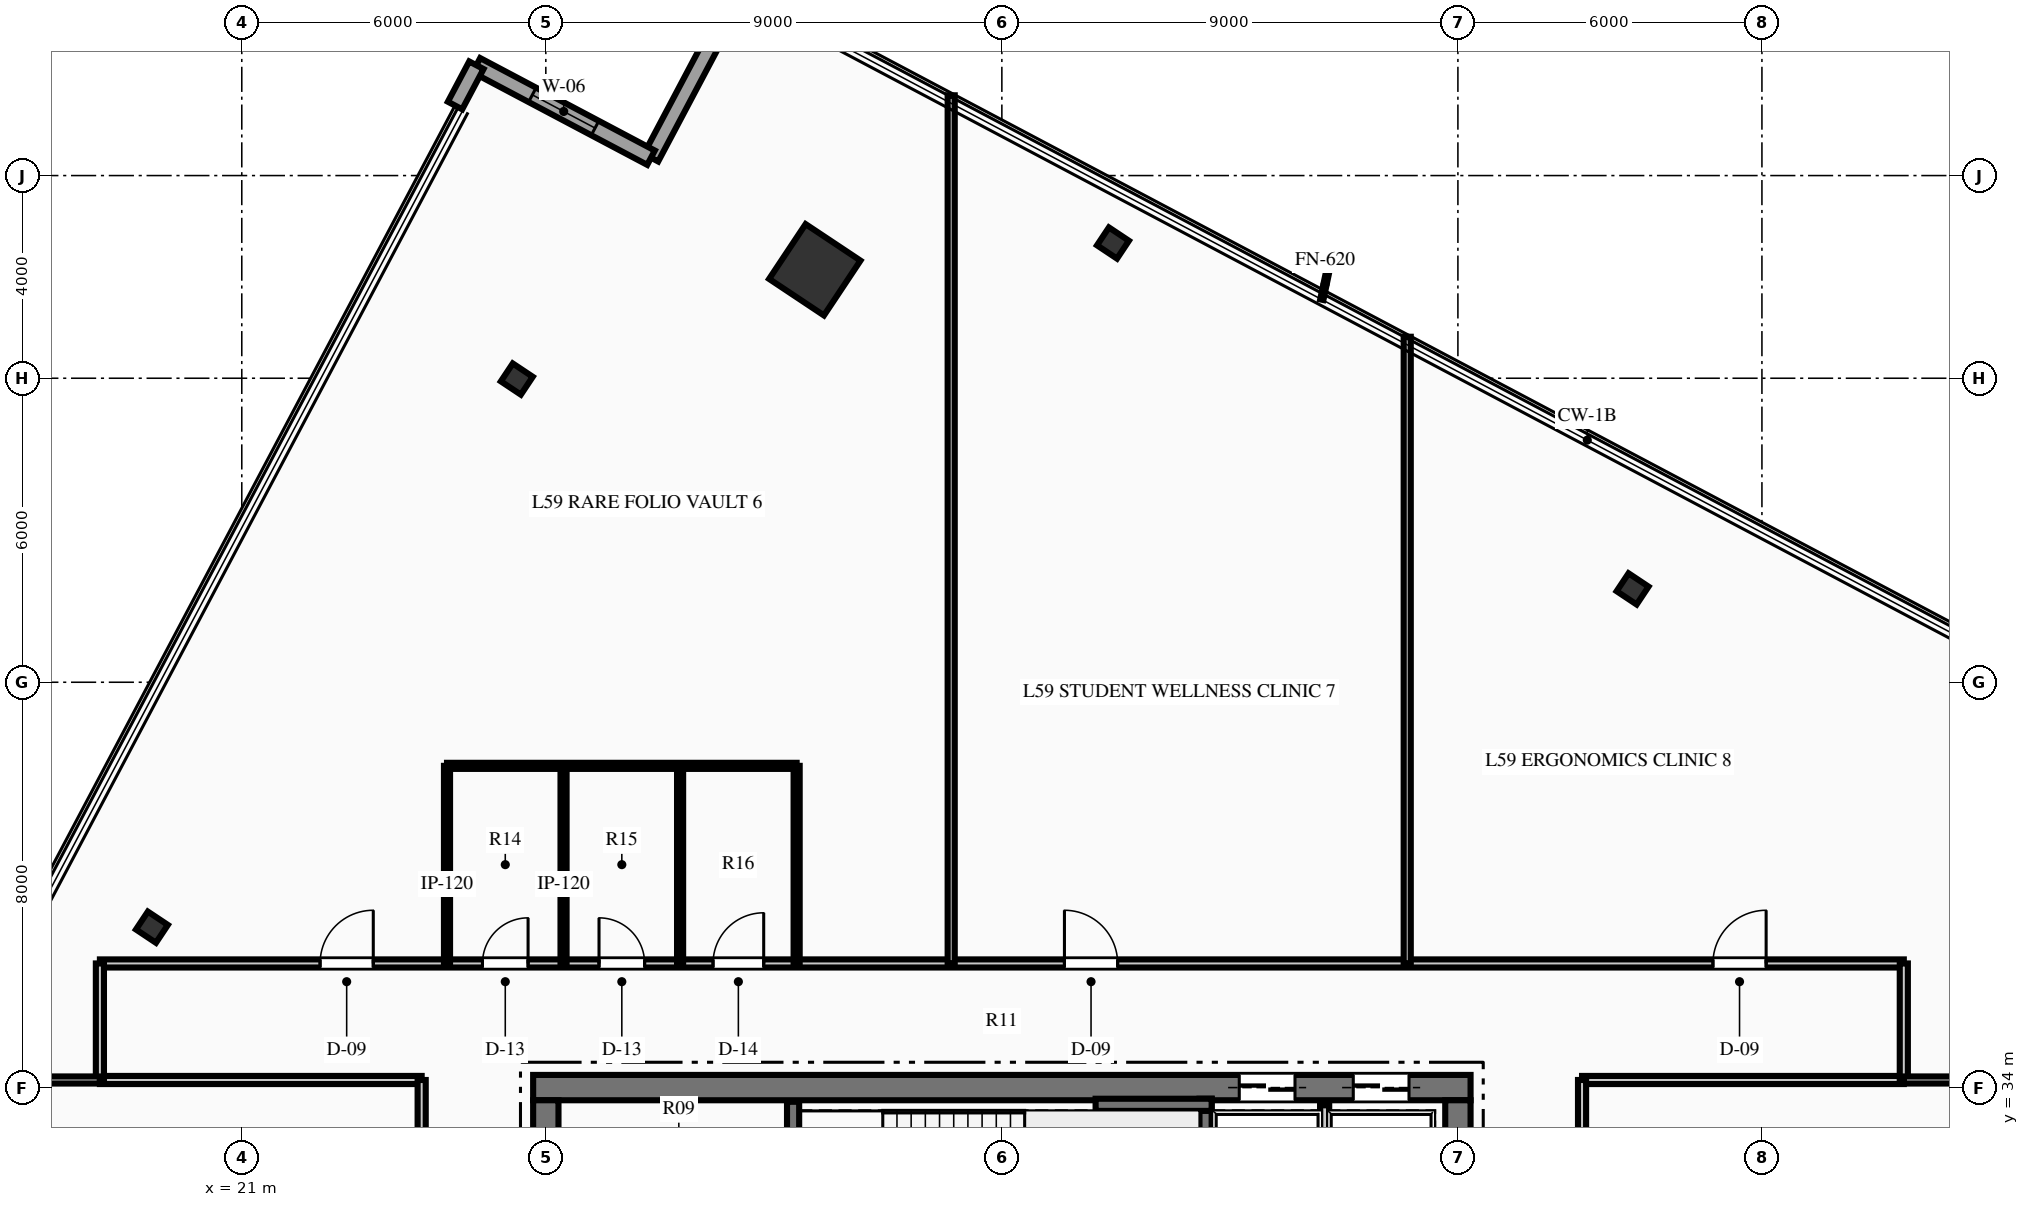
"""IFC4 building model, lengths in metres.
Left out: names, types, materials, properties, quantities, classifications, styles, units other than length and angle.
Written with IfcOpenShell. Run it as: python <this file> out.ifc"""

import sys

from ifc_helpers import new_model, si_unit, direction, frame, frame_2d, origin, origin_2d, place, context, subcontext, project, spatial, rectangle, hollow_rectangle, i_section, extrude, element, fill, save


model = new_model("IFC4")
c1 = context("Model", 3, precision=1e-05, world=origin(), true_north=direction((0.0, 1.0)))
c2 = subcontext(c1, "Body", "Model", "MODEL_VIEW")
j1 = project(units=[si_unit("LENGTHUNIT", "METRE"), si_unit("PLANEANGLEUNIT", "RADIAN")], contexts=[c1])
p1 = place(None, origin())
s1 = spatial("IfcSite", under=j1, at=p1, CompositionType="ELEMENT")
p2 = place(p1, origin())
s2 = spatial("IfcBuilding", under=s1, at=p2, CompositionType="ELEMENT")
p3 = place(p2, frame((0.0, 0.0, 235.95)))
s3 = spatial("IfcBuildingStorey", under=s2, at=p3, CompositionType="ELEMENT", Elevation=235.95)
p4 = place(p3, frame((26.75, 34.0, 0.0), z_axis=(0.0, 0.0, 1.0), x_axis=(1.0, 0.0, 0.0)))
e1 = element("IfcWall", 1, at=p4, inside=s3, PredefinedType="SHEAR", context=c2, shape_type="SweptSolid", body=[
    extrude(rectangle(XDim=18.5, YDim=0.5, at=frame_2d((9.25, 0.0))), origin(), (0.0, 0.0, 1.0), 3.75),
])
p5 = place(p4, frame((13.935, 0.0, 0.0)))
e2 = element("IfcOpeningElement", 2, at=p5, cuts=e1, PredefinedType="OPENING", context=c2, shape_type="SweptSolid", body=[
    extrude(rectangle(XDim=1.1, YDim=2.15, at=frame_2d((0.55, 1.075))), frame((0.0, 0.26, 0.0), z_axis=(0.0, -1.0, 0.0), x_axis=(1.0, 0.0, 0.0)), (0.0, 0.0, 1.0), 0.52),
])
p6 = place(p4, frame((16.185, 0.0, 0.0)))
e3 = element("IfcOpeningElement", 3, at=p6, cuts=e1, PredefinedType="OPENING", context=c2, shape_type="SweptSolid", body=[
    extrude(rectangle(XDim=1.1, YDim=2.15, at=frame_2d((0.55, 1.075))), frame((0.0, 0.26, 0.0), z_axis=(0.0, -1.0, 0.0), x_axis=(1.0, 0.0, 0.0)), (0.0, 0.0, 1.0), 0.52),
])
p7 = place(p3, frame((27.0, 18.25, 0.0), z_axis=(0.0, 0.0, 1.0), x_axis=(0.0, 1.0, 0.0)))
e4 = element("IfcWall", 4, at=p7, inside=s3, PredefinedType="SHEAR", context=c2, shape_type="SweptSolid", body=[
    extrude(rectangle(XDim=15.5, YDim=0.5, at=frame_2d((7.75, 0.0))), origin(), (0.0, 0.0, 1.0), 3.75),
])
p8 = place(p7, frame((9.99, 0.0, 0.0)))
e5 = element("IfcOpeningElement", 5, at=p8, cuts=e4, PredefinedType="OPENING", context=c2, shape_type="SweptSolid", body=[
    extrude(rectangle(XDim=1.4, YDim=2.2, at=frame_2d((0.7, 1.1))), frame((0.0, 0.26, 0.0), z_axis=(0.0, -1.0, 0.0), x_axis=(1.0, 0.0, 0.0)), (0.0, 0.0, 1.0), 0.52),
])
p9 = place(p3, frame((45.0, 18.25, 0.0), z_axis=(0.0, 0.0, 1.0), x_axis=(0.0, 1.0, 0.0)))
e6 = element("IfcWall", 6, at=p9, inside=s3, PredefinedType="SHEAR", context=c2, shape_type="SweptSolid", body=[
    extrude(rectangle(XDim=15.5, YDim=0.5, at=frame_2d((7.75, 0.0))), origin(), (0.0, 0.0, 1.0), 3.75),
])
p10 = place(p9, frame((9.99, 0.0, 0.0)))
e7 = element("IfcOpeningElement", 7, at=p10, cuts=e6, PredefinedType="OPENING", context=c2, shape_type="SweptSolid", body=[
    extrude(rectangle(XDim=1.4, YDim=2.2, at=frame_2d((0.7, 1.1))), frame((0.0, 0.26, 0.0), z_axis=(0.0, -1.0, 0.0), x_axis=(1.0, 0.0, 0.0)), (0.0, 0.0, 1.0), 0.52),
])
p11 = place(p3, frame((31.88, 29.93, 0.0), z_axis=(0.0, 0.0, 1.0), x_axis=(0.0, 1.0, 0.0)))
e8 = element("IfcWall", 8, at=p11, inside=s3, PredefinedType="SHEAR", context=c2, shape_type="SweptSolid", body=[
    extrude(rectangle(XDim=3.79, YDim=0.24, at=frame_2d((1.895, 0.0))), origin(), (0.0, 0.0, 1.0), 3.75),
])
p12 = place(p3, frame((40.02, 29.93, 0.0), z_axis=(0.0, 0.0, 1.0), x_axis=(0.0, 1.0, 0.0)))
e9 = element("IfcWall", 9, at=p12, inside=s3, PredefinedType="SHEAR", context=c2, shape_type="SweptSolid", body=[
    extrude(rectangle(XDim=3.85, YDim=0.24, at=frame_2d((1.925, 0.0))), origin(), (0.0, 0.0, 1.0), 3.75),
])
p13 = place(p3, frame((37.85, 33.66, 0.0), z_axis=(0.0, 0.0, 1.0), x_axis=(1.0, 0.0, 0.0)))
e10 = element("IfcWall", 10, at=p13, inside=s3, PredefinedType="SHEAR", context=c2, shape_type="SweptSolid", body=[
    extrude(rectangle(XDim=2.29, YDim=0.24, at=frame_2d((1.145, 0.0))), origin(), (0.0, 0.0, 1.0), 3.75),
])
p14 = place(p3, frame((32.308, 50.141, 0.0), z_axis=(0.0, 0.0, 1.0), x_axis=(0.554118199338, 0.832437998389, 0.0)))
e11 = element("IfcColumn", 11, at=p14, inside=s3, PredefinedType="COLUMN", context=c2, shape_type="SweptSolid", body=[
    extrude(hollow_rectangle(XDim=1.3, YDim=1.3, WallThickness=0.06, at=origin_2d()), origin(), (0.0, 0.0, 1.0), 3.75),
])
for number, where, z_axis, x_axis in (
    (12, (48.448, 43.842, 0.0), (0.0, 0.0, 1.0), (0.554, 0.832, 0.0)),
    (13, (38.193, 50.668, 0.0), (0.0, 0.0, 1.0), (0.554, 0.832, 0.0)),
    (14, (26.428, 47.984, 0.0), (0.0, 0.0, 1.0), (0.554, 0.832, 0.0)),
    (15, (19.226, 37.166, 0.0), (0.0, 0.0, 1.0), (0.554, 0.832, 0.0)),
):
    element("IfcColumn", number, at=place(p3, frame(where, z_axis=z_axis, x_axis=x_axis)), inside=s3, PredefinedType="COLUMN", context=c2, shape_type="SweptSolid", body=[
        extrude(i_section(OverallWidth=0.424, OverallDepth=0.474, WebThickness=0.048, FlangeThickness=0.077, at=origin_2d()), origin(), (0.0, 0.0, 1.0), 3.75),
    ])
p15 = place(p3, frame((29.076, 52.353, 0.0), z_axis=(0.0, 0.0, 1.0), x_axis=(0.467925110021, 0.883768120839, 0.0)))
e16 = element("IfcWall", 16, at=p15, inside=s3, PredefinedType="STANDARD", context=c2, shape_type="SweptSolid", body=[
    extrude(rectangle(XDim=3.9, YDim=0.32, at=frame_2d((1.95, 0.0))), origin(), (0.0, 0.0, 1.0), 3.4),
])
p16 = place(p3, frame((25.63, 54.178, 0.0), z_axis=(0.0, 0.0, 1.0), x_axis=(0.883754413477, -0.46795099814, 0.0)))
e17 = element("IfcWall", 17, at=p16, inside=s3, PredefinedType="STANDARD", context=c2, shape_type="SweptSolid", body=[
    extrude(rectangle(XDim=3.9, YDim=0.32, at=frame_2d((1.95, 0.0))), origin(), (0.0, 0.0, 1.0), 3.4),
])
p17 = place(p16, frame((1.25, 0.0, 0.85)))
e18 = element("IfcOpeningElement", 18, at=p17, cuts=e17, PredefinedType="OPENING", context=c2, shape_type="SweptSolid", body=[
    extrude(rectangle(XDim=1.4, YDim=2.0, at=frame_2d((0.7, 1.0))), frame((0.0, 0.17, 0.0), z_axis=(0.0, -1.0, 0.0), x_axis=(1.0, 0.0, 0.0)), (0.0, 0.0, 1.0), 0.34),
])
p18 = place(p3, frame((25.209, 53.382, 0.0), z_axis=(0.0, 0.0, 1.0), x_axis=(0.467925110021, 0.883768120839, 0.0)))
e19 = element("IfcWall", 19, at=p18, inside=s3, PredefinedType="STANDARD", context=c2, shape_type="SweptSolid", body=[
    extrude(rectangle(XDim=0.9, YDim=0.32, at=frame_2d((0.45, 0.0))), origin(), (0.0, 0.0, 1.0), 3.4),
])
p19 = place(p3, frame((42.37, 29.9, 0.0), z_axis=(0.0, 0.0, 1.0), x_axis=(0.0, 1.0, 0.0)))
e20 = element("IfcWall", 20, at=p19, inside=s3, PredefinedType="PARTITIONING", context=c2, shape_type="SweptSolid", body=[
    extrude(rectangle(XDim=3.75, YDim=0.18, at=frame_2d((1.875, 0.0))), origin(), (0.0, 0.0, 1.0), 3.4),
])
p20 = place(p3, frame((18.2, 36.45, 0.0), z_axis=(0.0, 0.0, 1.0), x_axis=(1.0, 0.0, 0.0)))
e21 = element("IfcWall", 21, at=p20, inside=s3, PredefinedType="PARTITIONING", context=c2, shape_type="SweptSolid", body=[
    extrude(rectangle(XDim=35.6, YDim=0.16, at=frame_2d((17.8, 0.0))), origin(), (0.0, 0.0, 1.0), 2.779),
])
p21 = place(p20, frame((7.55, 0.0, 0.0)))
e22 = element("IfcOpeningElement", 22, at=p21, cuts=e21, PredefinedType="OPENING", context=c2, shape_type="SweptSolid", body=[
    extrude(rectangle(XDim=0.9, YDim=2.15, at=frame_2d((0.45, 1.075))), frame((0.0, 0.09, 0.0), z_axis=(0.0, -1.0, 0.0), x_axis=(1.0, 0.0, 0.0)), (0.0, 0.0, 1.0), 0.18),
])
p22 = place(p20, frame((9.85, 0.0, 0.0)))
e23 = element("IfcOpeningElement", 23, at=p22, cuts=e21, PredefinedType="OPENING", context=c2, shape_type="SweptSolid", body=[
    extrude(rectangle(XDim=0.9, YDim=2.15, at=frame_2d((0.45, 1.075))), frame((0.0, 0.09, 0.0), z_axis=(0.0, -1.0, 0.0), x_axis=(1.0, 0.0, 0.0)), (0.0, 0.0, 1.0), 0.18),
])
p23 = place(p20, frame((12.1, 0.0, 0.0)))
e24 = element("IfcOpeningElement", 24, at=p23, cuts=e21, PredefinedType="OPENING", context=c2, shape_type="SweptSolid", body=[
    extrude(rectangle(XDim=1.0, YDim=2.15, at=frame_2d((0.5, 1.075))), frame((0.0, 0.09, 0.0), z_axis=(0.0, -1.0, 0.0), x_axis=(1.0, 0.0, 0.0)), (0.0, 0.0, 1.0), 0.18),
])
p24 = place(p20, frame((4.345, 0.0, 0.0)))
e25 = element("IfcOpeningElement", 25, at=p24, cuts=e21, PredefinedType="OPENING", context=c2, shape_type="SweptSolid", body=[
    extrude(rectangle(XDim=1.05, YDim=2.15, at=frame_2d((0.525, 1.075))), frame((0.0, 0.09, 0.0), z_axis=(0.0, -1.0, 0.0), x_axis=(1.0, 0.0, 0.0)), (0.0, 0.0, 1.0), 0.18),
])
p25 = place(p20, frame((19.035, 0.0, 0.0)))
e26 = element("IfcOpeningElement", 26, at=p25, cuts=e21, PredefinedType="OPENING", context=c2, shape_type="SweptSolid", body=[
    extrude(rectangle(XDim=1.05, YDim=2.15, at=frame_2d((0.525, 1.075))), frame((0.0, 0.09, 0.0), z_axis=(0.0, -1.0, 0.0), x_axis=(1.0, 0.0, 0.0)), (0.0, 0.0, 1.0), 0.18),
])
p26 = place(p20, frame((31.833, 0.0, 0.0)))
e27 = element("IfcOpeningElement", 27, at=p26, cuts=e21, PredefinedType="OPENING", context=c2, shape_type="SweptSolid", body=[
    extrude(rectangle(XDim=1.05, YDim=2.15, at=frame_2d((0.525, 1.075))), frame((0.0, 0.09, 0.0), z_axis=(0.0, -1.0, 0.0), x_axis=(1.0, 0.0, 0.0)), (0.0, 0.0, 1.0), 0.18),
])
for number, where, z_axis, x_axis in (
    (28, (18.2, 34.15, 0.0), (0.0, 0.0, 1.0), (1.0, 0.0, 0.0)),
    (29, (47.45, 34.15, 0.0), (0.0, 0.0, 1.0), (1.0, 0.0, 0.0)),
):
    element("IfcWall", number, at=place(p3, frame(where, z_axis=z_axis, x_axis=x_axis)), inside=s3, PredefinedType="PARTITIONING", context=c2, shape_type="SweptSolid", body=[
        extrude(rectangle(XDim=6.35, YDim=0.16, at=frame_2d((3.175, 0.0))), origin(), (0.0, 0.0, 1.0), 3.4),
    ])
p27 = place(p3, frame((24.55, 17.85, 0.0), z_axis=(0.0, 0.0, 1.0), x_axis=(0.0, 1.0, 0.0)))
e30 = element("IfcWall", 30, at=p27, inside=s3, PredefinedType="PARTITIONING", context=c2, shape_type="SweptSolid", body=[
    extrude(rectangle(XDim=16.3, YDim=0.16, at=frame_2d((8.15, 0.0))), origin(), (0.0, 0.0, 1.0), 3.4),
])
p28 = place(p27, frame((2.775, 0.0, 0.0)))
e31 = element("IfcOpeningElement", 31, at=p28, cuts=e30, PredefinedType="OPENING", context=c2, shape_type="SweptSolid", body=[
    extrude(rectangle(XDim=0.95, YDim=2.15, at=frame_2d((0.475, 1.075))), frame((0.0, 0.09, 0.0), z_axis=(0.0, -1.0, 0.0), x_axis=(1.0, 0.0, 0.0)), (0.0, 0.0, 1.0), 0.18),
])
p29 = place(p27, frame((8.729, 0.0, 0.0)))
e32 = element("IfcOpeningElement", 32, at=p29, cuts=e30, PredefinedType="OPENING", context=c2, shape_type="SweptSolid", body=[
    extrude(rectangle(XDim=1.05, YDim=2.15, at=frame_2d((0.525, 1.075))), frame((0.0, 0.09, 0.0), z_axis=(0.0, -1.0, 0.0), x_axis=(1.0, 0.0, 0.0)), (0.0, 0.0, 1.0), 0.18),
])
p30 = place(p3, frame((47.45, 27.25, 0.0), z_axis=(0.0, 0.0, 1.0), x_axis=(0.0, 1.0, 0.0)))
e33 = element("IfcWall", 33, at=p30, inside=s3, PredefinedType="PARTITIONING", context=c2, shape_type="SweptSolid", body=[
    extrude(rectangle(XDim=6.9, YDim=0.16, at=frame_2d((3.45, 0.0))), origin(), (0.0, 0.0, 1.0), 3.4),
])
p31 = place(p30, frame((1.683, 0.0, 0.0)))
e34 = element("IfcOpeningElement", 34, at=p31, cuts=e33, PredefinedType="OPENING", context=c2, shape_type="SweptSolid", body=[
    extrude(rectangle(XDim=1.05, YDim=2.15, at=frame_2d((0.525, 1.075))), frame((0.0, 0.09, 0.0), z_axis=(0.0, -1.0, 0.0), x_axis=(1.0, 0.0, 0.0)), (0.0, 0.0, 1.0), 0.18),
])
for number, where, z_axis, x_axis in (
    (35, (18.2, 34.15, 0.0), (0.0, 0.0, 1.0), (0.0, 1.0, 0.0)),
    (36, (53.8, 34.15, 0.0), (0.0, 0.0, 1.0), (0.0, 1.0, 0.0)),
):
    element("IfcWall", number, at=place(p3, frame(where, z_axis=z_axis, x_axis=x_axis)), inside=s3, PredefinedType="PARTITIONING", context=c2, shape_type="SweptSolid", body=[
        extrude(rectangle(XDim=2.3, YDim=0.16, at=frame_2d((1.15, 0.0))), origin(), (0.0, 0.0, 1.0), 3.4),
    ])
for number, where, z_axis, x_axis in (
    (37, (25.05, 36.45, 0.0), (0.0, 0.0, 1.0), (0.0, 1.0, 0.0)),
    (38, (27.35, 36.45, 0.0), (0.0, 0.0, 1.0), (0.0, 1.0, 0.0)),
    (39, (29.65, 36.45, 0.0), (0.0, 0.0, 1.0), (0.0, 1.0, 0.0)),
):
    element("IfcWall", number, at=place(p3, frame(where, z_axis=z_axis, x_axis=x_axis)), inside=s3, PredefinedType="PARTITIONING", context=c2, shape_type="SweptSolid", body=[
        extrude(rectangle(XDim=3.9, YDim=0.12, at=frame_2d((1.95, 0.0))), origin(), (0.0, 0.0, 1.0), 3.4),
    ])
p32 = place(p3, frame((31.95, 36.45, 0.0), z_axis=(0.0, 0.0, 1.0), x_axis=(0.0, 1.0, 0.0)))
e40 = element("IfcWall", 40, at=p32, inside=s3, PredefinedType="PARTITIONING", context=c2, shape_type="SweptSolid", body=[
    extrude(rectangle(XDim=3.9, YDim=0.12, at=frame_2d((1.95, 0.0))), origin(), (0.0, 0.0, 1.0), 2.779),
])
p33 = place(p3, frame((25.05, 40.35, 0.0), z_axis=(0.0, 0.0, 1.0), x_axis=(1.0, 0.0, 0.0)))
e41 = element("IfcWall", 41, at=p33, inside=s3, PredefinedType="PARTITIONING", context=c2, shape_type="SweptSolid", body=[
    extrude(rectangle(XDim=6.9, YDim=0.12, at=frame_2d((3.45, 0.0))), origin(), (0.0, 0.0, 1.0), 3.4),
])
p34 = place(p3, frame((15.071, 34.15, 0.0), z_axis=(0.0, 0.0, 1.0), x_axis=(1.0, 0.0, 0.0)))
e42 = element("IfcWall", 42, at=p34, inside=s3, PredefinedType="PARTITIONING", context=c2, shape_type="SweptSolid", body=[
    extrude(rectangle(XDim=3.129, YDim=0.14, at=frame_2d((1.564, 0.0))), origin(), (0.0, 0.0, 1.0), 3.4),
])
p35 = place(p3, frame((53.8, 34.15, 0.0), z_axis=(0.0, 0.0, 1.0), x_axis=(1.0, 0.0, 0.0)))
e43 = element("IfcWall", 43, at=p35, inside=s3, PredefinedType="PARTITIONING", context=c2, shape_type="SweptSolid", body=[
    extrude(rectangle(XDim=9.57, YDim=0.14, at=frame_2d((4.785, 0.0))), origin(), (0.0, 0.0, 1.0), 3.4),
])
p36 = place(p3, frame((35.0, 36.45, 0.0), z_axis=(0.0, 0.0, 1.0), x_axis=(0.0, 1.0, 0.0)))
e44 = element("IfcWall", 44, at=p36, inside=s3, PredefinedType="PARTITIONING", context=c2, shape_type="SweptSolid", body=[
    extrude(rectangle(XDim=17.134, YDim=0.14, at=frame_2d((8.567, 0.0))), origin(), (0.0, 0.0, 1.0), 3.4),
])
p37 = place(p3, frame((44.0, 36.45, 0.0), z_axis=(0.0, 0.0, 1.0), x_axis=(0.0, 1.0, 0.0)))
e45 = element("IfcWall", 45, at=p37, inside=s3, PredefinedType="PARTITIONING", context=c2, shape_type="SweptSolid", body=[
    extrude(rectangle(XDim=12.369, YDim=0.14, at=frame_2d((6.185, 0.0))), origin(), (0.0, 0.0, 1.0), 3.4),
])
p38 = place(p17, origin())
e46 = element("IfcWindow", 46, at=p38, inside=s3, PartitioningType="SINGLE_PANEL", PredefinedType="WINDOW", context=c2, shape_type="SweptSolid", body=[
    extrude(rectangle(XDim=1.4, YDim=2.0, at=frame_2d((0.7, 1.0))), frame((0.0, 0.03, 0.0), z_axis=(0.0, -1.0, 0.0), x_axis=(1.0, 0.0, 0.0)), (0.0, 0.0, 1.0), 0.06),
])
fill(e18, e46)
p39 = place(p21, origin())
e47 = element("IfcDoor", 47, at=p39, inside=s3, OperationType="SINGLE_SWING_RIGHT", PredefinedType="DOOR", context=c2, shape_type="SweptSolid", body=[
    extrude(rectangle(XDim=0.9, YDim=2.15, at=frame_2d((0.45, 1.075))), frame((0.0, 0.025, 0.0), z_axis=(0.0, -1.0, 0.0), x_axis=(1.0, 0.0, 0.0)), (0.0, 0.0, 1.0), 0.05),
])
fill(e22, e47)
p40 = place(p22, origin())
e48 = element("IfcDoor", 48, at=p40, inside=s3, OperationType="SINGLE_SWING_LEFT", PredefinedType="DOOR", context=c2, shape_type="SweptSolid", body=[
    extrude(rectangle(XDim=0.9, YDim=2.15, at=frame_2d((0.45, 1.075))), frame((0.0, 0.025, 0.0), z_axis=(0.0, -1.0, 0.0), x_axis=(1.0, 0.0, 0.0)), (0.0, 0.0, 1.0), 0.05),
])
fill(e23, e48)
p41 = place(p23, origin())
e49 = element("IfcDoor", 49, at=p41, inside=s3, OperationType="SINGLE_SWING_RIGHT", PredefinedType="DOOR", context=c2, shape_type="SweptSolid", body=[
    extrude(rectangle(XDim=1.0, YDim=2.15, at=frame_2d((0.5, 1.075))), frame((0.0, 0.025, 0.0), z_axis=(0.0, -1.0, 0.0), x_axis=(1.0, 0.0, 0.0)), (0.0, 0.0, 1.0), 0.05),
])
fill(e24, e49)
p42 = place(p24, origin())
e50 = element("IfcDoor", 50, at=p42, inside=s3, OperationType="SINGLE_SWING_RIGHT", PredefinedType="DOOR", context=c2, shape_type="SweptSolid", body=[
    extrude(rectangle(XDim=1.05, YDim=2.15, at=frame_2d((0.525, 1.075))), frame((0.0, 0.025, 0.0), z_axis=(0.0, -1.0, 0.0), x_axis=(1.0, 0.0, 0.0)), (0.0, 0.0, 1.0), 0.05),
])
fill(e25, e50)
p43 = place(p25, origin())
e51 = element("IfcDoor", 51, at=p43, inside=s3, OperationType="SINGLE_SWING_LEFT", PredefinedType="DOOR", context=c2, shape_type="SweptSolid", body=[
    extrude(rectangle(XDim=1.05, YDim=2.15, at=frame_2d((0.525, 1.075))), frame((0.0, 0.025, 0.0), z_axis=(0.0, -1.0, 0.0), x_axis=(1.0, 0.0, 0.0)), (0.0, 0.0, 1.0), 0.05),
])
fill(e26, e51)
p44 = place(p26, origin())
e52 = element("IfcDoor", 52, at=p44, inside=s3, OperationType="SINGLE_SWING_RIGHT", PredefinedType="DOOR", context=c2, shape_type="SweptSolid", body=[
    extrude(rectangle(XDim=1.05, YDim=2.15, at=frame_2d((0.525, 1.075))), frame((0.0, 0.025, 0.0), z_axis=(0.0, -1.0, 0.0), x_axis=(1.0, 0.0, 0.0)), (0.0, 0.0, 1.0), 0.05),
])
fill(e27, e52)
p45 = place(p5, origin())
e53 = element("IfcDoor", 53, at=p45, inside=s3, OperationType="SLIDING_TO_LEFT", PredefinedType="DOOR", context=c2, shape_type="SweptSolid", body=[
    extrude(rectangle(XDim=1.1, YDim=2.15, at=frame_2d((0.55, 1.075))), frame((0.0, 0.025, 0.0), z_axis=(0.0, -1.0, 0.0), x_axis=(1.0, 0.0, 0.0)), (0.0, 0.0, 1.0), 0.05),
])
fill(e2, e53)
p46 = place(p6, origin())
e54 = element("IfcDoor", 54, at=p46, inside=s3, OperationType="SLIDING_TO_LEFT", PredefinedType="DOOR", context=c2, shape_type="SweptSolid", body=[
    extrude(rectangle(XDim=1.1, YDim=2.15, at=frame_2d((0.55, 1.075))), frame((0.0, 0.025, 0.0), z_axis=(0.0, -1.0, 0.0), x_axis=(1.0, 0.0, 0.0)), (0.0, 0.0, 1.0), 0.05),
])
fill(e3, e54)
save(model, sys.argv[1])
